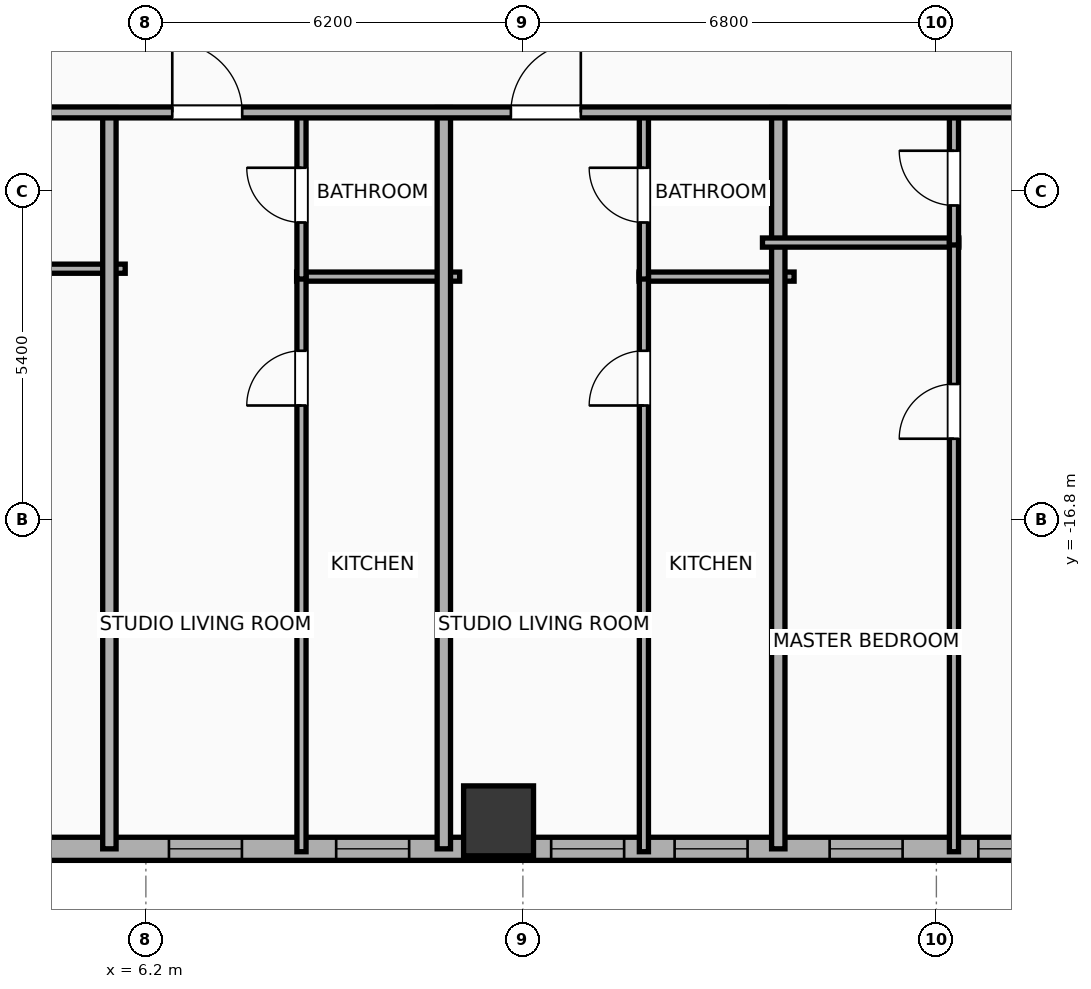
"""IFC4 building model, lengths in metres.
Left out: names, types, materials, properties, quantities, classifications, styles, units other than length and angle.
Written with IfcOpenShell. Run it as: python <this file> out.ifc"""

import sys

from ifc_helpers import new_model, si_unit, direction, frame, frame_2d, origin, origin_2d, place, context, subcontext, project, spatial, rectangle, hollow_rectangle, extrude, element, fill, save


model = new_model("IFC4")
c1 = context("Model", 3, precision=1e-05, world=origin(), true_north=direction((0.0, 1.0)))
c2 = subcontext(c1, "Body", "Model", "MODEL_VIEW")
j1 = project(units=[si_unit("LENGTHUNIT", "METRE"), si_unit("PLANEANGLEUNIT", "RADIAN")], contexts=[c1])
p1 = place(None, origin())
s1 = spatial("IfcSite", under=j1, at=p1, CompositionType="ELEMENT")
p2 = place(p1, origin())
s2 = spatial("IfcBuilding", under=s1, at=p2, CompositionType="ELEMENT")
p3 = place(p2, frame((0.0, 0.0, 41.6)))
s3 = spatial("IfcBuildingStorey", under=s2, at=p3, CompositionType="ELEMENT", Elevation=41.6)
p4 = place(p3, frame((12.0, -21.75, 0.0), z_axis=(0.0, 0.0, 1.0), x_axis=(1.0, 0.0, 0.0)))
e1 = element("IfcColumn", 1, at=p4, inside=s3, PredefinedType="COLUMN", context=c2, shape_type="SweptSolid", body=[
    extrude(hollow_rectangle(XDim=1.15, YDim=1.15, WallThickness=0.04, at=origin_2d()), origin(), (0.0, 0.0, 1.0), 3.9),
])
p5 = place(p3, frame((22.381, -22.21, 0.0), z_axis=(0.0, 0.0, 1.0), x_axis=(-1.0, 0.0, 0.0)))
e2 = element("IfcWall", 2, at=p5, inside=s3, PredefinedType="ELEMENTEDWALL", context=c2, shape_type="SweptSolid", body=[
    extrude(rectangle(XDim=51.963, YDim=0.38, at=frame_2d((25.981, 0.0))), origin(), (0.0, 0.0, 1.0), 3.65),
])
p6 = place(p5, frame((42.952, 0.0, 0.75)))
e3 = element("IfcOpeningElement", 3, at=p6, cuts=e2, PredefinedType="OPENING", context=c2, shape_type="SweptSolid", body=[
    extrude(rectangle(XDim=2.4, YDim=2.1, at=frame_2d((1.2, 1.05))), frame((0.0, 0.2, 0.0), z_axis=(0.0, -1.0, 0.0), x_axis=(1.0, 0.0, 0.0)), (0.0, 0.0, 1.0), 0.4),
])
p7 = place(p5, frame((49.847, 0.0, 0.75)))
e4 = element("IfcOpeningElement", 4, at=p7, cuts=e2, PredefinedType="OPENING", context=c2, shape_type="SweptSolid", body=[
    extrude(rectangle(XDim=1.2, YDim=2.05, at=frame_2d((0.6, 1.025))), frame((0.0, 0.2, 0.0), z_axis=(0.0, -1.0, 0.0), x_axis=(1.0, 0.0, 0.0)), (0.0, 0.0, 1.0), 0.4),
])
p8 = place(p5, frame((47.445, 0.0, 0.75)))
e5 = element("IfcOpeningElement", 5, at=p8, cuts=e2, PredefinedType="OPENING", context=c2, shape_type="SweptSolid", body=[
    extrude(rectangle(XDim=1.2, YDim=2.05, at=frame_2d((0.6, 1.025))), frame((0.0, 0.2, 0.0), z_axis=(0.0, -1.0, 0.0), x_axis=(1.0, 0.0, 0.0)), (0.0, 0.0, 1.0), 0.4),
])
p9 = place(p5, frame((39.526, 0.0, 0.75)))
e6 = element("IfcOpeningElement", 6, at=p9, cuts=e2, PredefinedType="OPENING", context=c2, shape_type="SweptSolid", body=[
    extrude(rectangle(XDim=1.2, YDim=2.05, at=frame_2d((0.6, 1.025))), frame((0.0, 0.2, 0.0), z_axis=(0.0, -1.0, 0.0), x_axis=(1.0, 0.0, 0.0)), (0.0, 0.0, 1.0), 0.4),
])
p10 = place(p5, frame((33.018, 0.0, 0.75)))
e7 = element("IfcOpeningElement", 7, at=p10, cuts=e2, PredefinedType="OPENING", context=c2, shape_type="SweptSolid", body=[
    extrude(rectangle(XDim=1.2, YDim=2.05, at=frame_2d((0.6, 1.025))), frame((0.0, 0.2, 0.0), z_axis=(0.0, -1.0, 0.0), x_axis=(1.0, 0.0, 0.0)), (0.0, 0.0, 1.0), 0.4),
])
p11 = place(p5, frame((36.813, 0.0, 0.75)))
e8 = element("IfcOpeningElement", 8, at=p11, cuts=e2, PredefinedType="OPENING", context=c2, shape_type="SweptSolid", body=[
    extrude(rectangle(XDim=1.2, YDim=2.05, at=frame_2d((0.6, 1.025))), frame((0.0, 0.2, 0.0), z_axis=(0.0, -1.0, 0.0), x_axis=(1.0, 0.0, 0.0)), (0.0, 0.0, 1.0), 0.4),
])
p12 = place(p5, frame((28.886, 0.0, 0.75)))
e9 = element("IfcOpeningElement", 9, at=p12, cuts=e2, PredefinedType="OPENING", context=c2, shape_type="SweptSolid", body=[
    extrude(rectangle(XDim=1.2, YDim=2.05, at=frame_2d((0.6, 1.025))), frame((0.0, 0.2, 0.0), z_axis=(0.0, -1.0, 0.0), x_axis=(1.0, 0.0, 0.0)), (0.0, 0.0, 1.0), 0.4),
])
p13 = place(p5, frame((23.306, 0.0, 0.75)))
e10 = element("IfcOpeningElement", 10, at=p13, cuts=e2, PredefinedType="OPENING", context=c2, shape_type="SweptSolid", body=[
    extrude(rectangle(XDim=1.2, YDim=2.05, at=frame_2d((0.6, 1.025))), frame((0.0, 0.2, 0.0), z_axis=(0.0, -1.0, 0.0), x_axis=(1.0, 0.0, 0.0)), (0.0, 0.0, 1.0), 0.4),
])
p14 = place(p5, frame((26.056, 0.0, 0.75)))
e11 = element("IfcOpeningElement", 11, at=p14, cuts=e2, PredefinedType="OPENING", context=c2, shape_type="SweptSolid", body=[
    extrude(rectangle(XDim=1.2, YDim=2.05, at=frame_2d((0.6, 1.025))), frame((0.0, 0.2, 0.0), z_axis=(0.0, -1.0, 0.0), x_axis=(1.0, 0.0, 0.0)), (0.0, 0.0, 1.0), 0.4),
])
p15 = place(p5, frame((18.811, 0.0, 0.75)))
e12 = element("IfcOpeningElement", 12, at=p15, cuts=e2, PredefinedType="OPENING", context=c2, shape_type="SweptSolid", body=[
    extrude(rectangle(XDim=1.2, YDim=2.05, at=frame_2d((0.6, 1.025))), frame((0.0, 0.2, 0.0), z_axis=(0.0, -1.0, 0.0), x_axis=(1.0, 0.0, 0.0)), (0.0, 0.0, 1.0), 0.4),
])
p16 = place(p5, frame((14.602, 0.0, 0.75)))
e13 = element("IfcOpeningElement", 13, at=p16, cuts=e2, PredefinedType="OPENING", context=c2, shape_type="SweptSolid", body=[
    extrude(rectangle(XDim=1.2, YDim=2.05, at=frame_2d((0.6, 1.025))), frame((0.0, 0.2, 0.0), z_axis=(0.0, -1.0, 0.0), x_axis=(1.0, 0.0, 0.0)), (0.0, 0.0, 1.0), 0.4),
])
p17 = place(p5, frame((11.852, 0.0, 0.75)))
e14 = element("IfcOpeningElement", 14, at=p17, cuts=e2, PredefinedType="OPENING", context=c2, shape_type="SweptSolid", body=[
    extrude(rectangle(XDim=1.2, YDim=2.05, at=frame_2d((0.6, 1.025))), frame((0.0, 0.2, 0.0), z_axis=(0.0, -1.0, 0.0), x_axis=(1.0, 0.0, 0.0)), (0.0, 0.0, 1.0), 0.4),
])
p18 = place(p5, frame((8.316, 0.0, 0.75)))
e15 = element("IfcOpeningElement", 15, at=p18, cuts=e2, PredefinedType="OPENING", context=c2, shape_type="SweptSolid", body=[
    extrude(rectangle(XDim=1.2, YDim=2.05, at=frame_2d((0.6, 1.025))), frame((0.0, 0.2, 0.0), z_axis=(0.0, -1.0, 0.0), x_axis=(1.0, 0.0, 0.0)), (0.0, 0.0, 1.0), 0.4),
])
p19 = place(p5, frame((6.286, 0.0, 0.75)))
e16 = element("IfcOpeningElement", 16, at=p19, cuts=e2, PredefinedType="OPENING", context=c2, shape_type="SweptSolid", body=[
    extrude(rectangle(XDim=1.2, YDim=2.05, at=frame_2d((0.6, 1.025))), frame((0.0, 0.2, 0.0), z_axis=(0.0, -1.0, 0.0), x_axis=(1.0, 0.0, 0.0)), (0.0, 0.0, 1.0), 0.4),
])
p20 = place(p5, frame((3.737, 0.0, 0.75)))
e17 = element("IfcOpeningElement", 17, at=p20, cuts=e2, PredefinedType="OPENING", context=c2, shape_type="SweptSolid", body=[
    extrude(rectangle(XDim=1.2, YDim=2.05, at=frame_2d((0.6, 1.025))), frame((0.0, 0.2, 0.0), z_axis=(0.0, -1.0, 0.0), x_axis=(1.0, 0.0, 0.0)), (0.0, 0.0, 1.0), 0.4),
])
p21 = place(p5, frame((1.291, 0.0, 0.75)))
e18 = element("IfcOpeningElement", 18, at=p21, cuts=e2, PredefinedType="OPENING", context=c2, shape_type="SweptSolid", body=[
    extrude(rectangle(XDim=1.2, YDim=2.05, at=frame_2d((0.6, 1.025))), frame((0.0, 0.2, 0.0), z_axis=(0.0, -1.0, 0.0), x_axis=(1.0, 0.0, 0.0)), (0.0, 0.0, 1.0), 0.4),
])
p22 = place(p3, frame((3.651, -12.67, 0.0), z_axis=(0.0, 0.0, 1.0), x_axis=(1.0, 0.0, 0.0)))
e19 = element("IfcWall", 19, at=p22, inside=s3, PredefinedType="PLUMBINGWALL", context=c2, shape_type="SweptSolid", body=[
    extrude(rectangle(XDim=2.209, YDim=0.15, at=frame_2d((1.104, 0.0))), origin(), (0.0, 0.0, 1.0), 3.65),
])
p23 = place(p3, frame((5.6, -22.21, 0.0), z_axis=(0.0, 0.0, 1.0), x_axis=(0.0, 1.0, 0.0)))
e20 = element("IfcWall", 20, at=p23, inside=s3, PredefinedType="PARTITIONING", context=c2, shape_type="SweptSolid", body=[
    extrude(rectangle(XDim=12.19, YDim=0.22, at=frame_2d((6.095, 0.0))), origin(), (0.0, 0.0, 1.0), 3.65),
])
p24 = place(p3, frame((8.679, -12.8, 0.0), z_axis=(0.0, 0.0, 1.0), x_axis=(1.0, 0.0, 0.0)))
e21 = element("IfcWall", 21, at=p24, inside=s3, PredefinedType="PLUMBINGWALL", context=c2, shape_type="SweptSolid", body=[
    extrude(rectangle(XDim=2.681, YDim=0.15, at=frame_2d((1.341, 0.0))), origin(), (0.0, 0.0, 1.0), 3.65),
])
p25 = place(p3, frame((8.759, -22.258, 0.0), z_axis=(0.0, 0.0, 1.0), x_axis=(0.0, 1.0, 0.0)))
e22 = element("IfcWall", 22, at=p25, inside=s3, PredefinedType="PLUMBINGWALL", context=c2, shape_type="SweptSolid", body=[
    extrude(rectangle(XDim=9.498, YDim=0.15, at=frame_2d((4.749, 0.0))), origin(), (0.0, 0.0, 1.0), 3.65),
])
p26 = place(p25, frame((7.338, 0.0, 0.0)))
e23 = element("IfcOpeningElement", 23, at=p26, cuts=e22, PredefinedType="OPENING", context=c2, shape_type="SweptSolid", body=[
    extrude(rectangle(XDim=0.9, YDim=2.05, at=frame_2d((0.45, 1.025))), frame((0.0, 0.085, 0.0), z_axis=(0.0, -1.0, 0.0), x_axis=(1.0, 0.0, 0.0)), (0.0, 0.0, 1.0), 0.17),
])
p27 = place(p3, frame((8.759, -12.84, 0.0), z_axis=(0.0, 0.0, 1.0), x_axis=(0.0, 1.0, 0.0)))
e24 = element("IfcWall", 24, at=p27, inside=s3, PredefinedType="PLUMBINGWALL", context=c2, shape_type="SweptSolid", body=[
    extrude(rectangle(XDim=2.76, YDim=0.15, at=frame_2d((1.38, 0.0))), origin(), (0.0, 0.0, 1.0), 3.65),
])
p28 = place(p27, frame((0.93, 0.0, 0.0)))
e25 = element("IfcOpeningElement", 25, at=p28, cuts=e24, PredefinedType="OPENING", context=c2, shape_type="SweptSolid", body=[
    extrude(rectangle(XDim=0.9, YDim=2.05, at=frame_2d((0.45, 1.025))), frame((0.0, 0.085, 0.0), z_axis=(0.0, -1.0, 0.0), x_axis=(1.0, 0.0, 0.0)), (0.0, 0.0, 1.0), 0.17),
])
p29 = place(p3, frame((11.1, -22.21, 0.0), z_axis=(0.0, 0.0, 1.0), x_axis=(0.0, 1.0, 0.0)))
e26 = element("IfcWall", 26, at=p29, inside=s3, PredefinedType="PARTITIONING", context=c2, shape_type="SweptSolid", body=[
    extrude(rectangle(XDim=12.19, YDim=0.22, at=frame_2d((6.095, 0.0))), origin(), (0.0, 0.0, 1.0), 3.65),
])
p30 = place(p3, frame((14.31, -12.8, 0.0), z_axis=(0.0, 0.0, 1.0), x_axis=(1.0, 0.0, 0.0)))
e27 = element("IfcWall", 27, at=p30, inside=s3, PredefinedType="PLUMBINGWALL", context=c2, shape_type="SweptSolid", body=[
    extrude(rectangle(XDim=2.55, YDim=0.15, at=frame_2d((1.275, 0.0))), origin(), (0.0, 0.0, 1.0), 3.65),
])
p31 = place(p3, frame((14.39, -22.258, 0.0), z_axis=(0.0, 0.0, 1.0), x_axis=(0.0, 1.0, 0.0)))
e28 = element("IfcWall", 28, at=p31, inside=s3, PredefinedType="PLUMBINGWALL", context=c2, shape_type="SweptSolid", body=[
    extrude(rectangle(XDim=9.498, YDim=0.15, at=frame_2d((4.749, 0.0))), origin(), (0.0, 0.0, 1.0), 3.65),
])
p32 = place(p31, frame((7.338, 0.0, 0.0)))
e29 = element("IfcOpeningElement", 29, at=p32, cuts=e28, PredefinedType="OPENING", context=c2, shape_type="SweptSolid", body=[
    extrude(rectangle(XDim=0.9, YDim=2.05, at=frame_2d((0.45, 1.025))), frame((0.0, 0.085, 0.0), z_axis=(0.0, -1.0, 0.0), x_axis=(1.0, 0.0, 0.0)), (0.0, 0.0, 1.0), 0.17),
])
p33 = place(p3, frame((14.39, -12.84, 0.0), z_axis=(0.0, 0.0, 1.0), x_axis=(0.0, 1.0, 0.0)))
e30 = element("IfcWall", 30, at=p33, inside=s3, PredefinedType="PLUMBINGWALL", context=c2, shape_type="SweptSolid", body=[
    extrude(rectangle(XDim=2.76, YDim=0.15, at=frame_2d((1.38, 0.0))), origin(), (0.0, 0.0, 1.0), 3.65),
])
p34 = place(p33, frame((0.93, 0.0, 0.0)))
e31 = element("IfcOpeningElement", 31, at=p34, cuts=e30, PredefinedType="OPENING", context=c2, shape_type="SweptSolid", body=[
    extrude(rectangle(XDim=0.9, YDim=2.05, at=frame_2d((0.45, 1.025))), frame((0.0, 0.085, 0.0), z_axis=(0.0, -1.0, 0.0), x_axis=(1.0, 0.0, 0.0)), (0.0, 0.0, 1.0), 0.17),
])
p35 = place(p3, frame((16.6, -22.21, 0.0), z_axis=(0.0, 0.0, 1.0), x_axis=(0.0, 1.0, 0.0)))
e32 = element("IfcWall", 32, at=p35, inside=s3, PredefinedType="PARTITIONING", context=c2, shape_type="SweptSolid", body=[
    extrude(rectangle(XDim=12.19, YDim=0.22, at=frame_2d((6.095, 0.0))), origin(), (0.0, 0.0, 1.0), 3.65),
])
p36 = place(p3, frame((16.34, -12.24, 0.0), z_axis=(0.0, 0.0, 1.0), x_axis=(1.0, 0.0, 0.0)))
e33 = element("IfcWall", 33, at=p36, inside=s3, PredefinedType="PLUMBINGWALL", context=c2, shape_type="SweptSolid", body=[
    extrude(rectangle(XDim=3.229, YDim=0.15, at=frame_2d((1.615, 0.0))), origin(), (0.0, 0.0, 1.0), 3.65),
])
p37 = place(p3, frame((19.489, -22.258, 0.0), z_axis=(0.0, 0.0, 1.0), x_axis=(0.0, 1.0, 0.0)))
e34 = element("IfcWall", 34, at=p37, inside=s3, PredefinedType="PLUMBINGWALL", context=c2, shape_type="SweptSolid", body=[
    extrude(rectangle(XDim=10.058, YDim=0.15, at=frame_2d((5.029, 0.0))), origin(), (0.0, 0.0, 1.0), 3.65),
])
p38 = place(p37, frame((6.792, 0.0, 0.0)))
e35 = element("IfcOpeningElement", 35, at=p38, cuts=e34, PredefinedType="OPENING", context=c2, shape_type="SweptSolid", body=[
    extrude(rectangle(XDim=0.9, YDim=2.05, at=frame_2d((0.45, 1.025))), frame((0.0, 0.085, 0.0), z_axis=(0.0, -1.0, 0.0), x_axis=(1.0, 0.0, 0.0)), (0.0, 0.0, 1.0), 0.17),
])
p39 = place(p3, frame((19.489, -12.28, 0.0), z_axis=(0.0, 0.0, 1.0), x_axis=(0.0, 1.0, 0.0)))
e36 = element("IfcWall", 36, at=p39, inside=s3, PredefinedType="PLUMBINGWALL", context=c2, shape_type="SweptSolid", body=[
    extrude(rectangle(XDim=2.2, YDim=0.15, at=frame_2d((1.1, 0.0))), origin(), (0.0, 0.0, 1.0), 3.65),
])
p40 = place(p39, frame((0.65, 0.0, 0.0)))
e37 = element("IfcOpeningElement", 37, at=p40, cuts=e36, PredefinedType="OPENING", context=c2, shape_type="SweptSolid", body=[
    extrude(rectangle(XDim=0.9, YDim=2.05, at=frame_2d((0.45, 1.025))), frame((0.0, 0.085, 0.0), z_axis=(0.0, -1.0, 0.0), x_axis=(1.0, 0.0, 0.0)), (0.0, 0.0, 1.0), 0.17),
])
p41 = place(p3, frame((-33.41, -10.1, 0.0), z_axis=(0.0, 0.0, 1.0), x_axis=(1.0, 0.0, 0.0)))
e38 = element("IfcWall", 38, at=p41, inside=s3, PredefinedType="PARTITIONING", context=c2, shape_type="SweptSolid", body=[
    extrude(rectangle(XDim=59.62, YDim=0.18, at=frame_2d((29.81, 0.0))), origin(), (0.0, 0.0, 1.0), 3.65),
])
p42 = place(p41, frame((2.746, 0.0, 0.0)))
e39 = element("IfcOpeningElement", 39, at=p42, cuts=e38, PredefinedType="OPENING", context=c2, shape_type="SweptSolid", body=[
    extrude(rectangle(XDim=0.9, YDim=2.05, at=frame_2d((0.45, 1.025))), frame((0.0, 0.1, 0.0), z_axis=(0.0, -1.0, 0.0), x_axis=(1.0, 0.0, 0.0)), (0.0, 0.0, 1.0), 0.2),
])
p43 = place(p41, frame((11.552, 0.0, 0.0)))
e40 = element("IfcOpeningElement", 40, at=p43, cuts=e38, PredefinedType="OPENING", context=c2, shape_type="SweptSolid", body=[
    extrude(rectangle(XDim=1.15, YDim=2.05, at=frame_2d((0.575, 1.025))), frame((0.0, 0.1, 0.0), z_axis=(0.0, -1.0, 0.0), x_axis=(1.0, 0.0, 0.0)), (0.0, 0.0, 1.0), 0.2),
])
p44 = place(p41, frame((22.379, 0.0, 0.0)))
e41 = element("IfcOpeningElement", 41, at=p44, cuts=e38, PredefinedType="OPENING", context=c2, shape_type="SweptSolid", body=[
    extrude(rectangle(XDim=1.15, YDim=2.05, at=frame_2d((0.575, 1.025))), frame((0.0, 0.1, 0.0), z_axis=(0.0, -1.0, 0.0), x_axis=(1.0, 0.0, 0.0)), (0.0, 0.0, 1.0), 0.2),
])
p45 = place(p41, frame((31.28, 0.0, 0.0)))
e42 = element("IfcOpeningElement", 42, at=p45, cuts=e38, PredefinedType="OPENING", context=c2, shape_type="SweptSolid", body=[
    extrude(rectangle(XDim=1.15, YDim=2.05, at=frame_2d((0.575, 1.025))), frame((0.0, 0.1, 0.0), z_axis=(0.0, -1.0, 0.0), x_axis=(1.0, 0.0, 0.0)), (0.0, 0.0, 1.0), 0.2),
])
p46 = place(p41, frame((36.02, 0.0, 0.0)))
e43 = element("IfcOpeningElement", 43, at=p46, cuts=e38, PredefinedType="OPENING", context=c2, shape_type="SweptSolid", body=[
    extrude(rectangle(XDim=0.9, YDim=2.05, at=frame_2d((0.45, 1.025))), frame((0.0, 0.1, 0.0), z_axis=(0.0, -1.0, 0.0), x_axis=(1.0, 0.0, 0.0)), (0.0, 0.0, 1.0), 0.2),
])
p47 = place(p41, frame((40.044, 0.0, 0.0)))
e44 = element("IfcOpeningElement", 44, at=p47, cuts=e38, PredefinedType="OPENING", context=c2, shape_type="SweptSolid", body=[
    extrude(rectangle(XDim=1.15, YDim=2.05, at=frame_2d((0.575, 1.025))), frame((0.0, 0.1, 0.0), z_axis=(0.0, -1.0, 0.0), x_axis=(1.0, 0.0, 0.0)), (0.0, 0.0, 1.0), 0.2),
])
p48 = place(p41, frame((45.613, 0.0, 0.0)))
e45 = element("IfcOpeningElement", 45, at=p48, cuts=e38, PredefinedType="OPENING", context=c2, shape_type="SweptSolid", body=[
    extrude(rectangle(XDim=1.15, YDim=2.05, at=frame_2d((0.575, 1.025))), frame((0.0, 0.1, 0.0), z_axis=(0.0, -1.0, 0.0), x_axis=(1.0, 0.0, 0.0)), (0.0, 0.0, 1.0), 0.2),
])
p49 = place(p41, frame((54.174, 0.0, 0.0)))
e46 = element("IfcOpeningElement", 46, at=p49, cuts=e38, PredefinedType="OPENING", context=c2, shape_type="SweptSolid", body=[
    extrude(rectangle(XDim=1.15, YDim=2.05, at=frame_2d((0.575, 1.025))), frame((0.0, 0.1, 0.0), z_axis=(0.0, -1.0, 0.0), x_axis=(1.0, 0.0, 0.0)), (0.0, 0.0, 1.0), 0.2),
])
p50 = place(p16, origin())
e47 = element("IfcWindow", 47, at=p50, inside=s3, PartitioningType="SINGLE_PANEL", PredefinedType="WINDOW", context=c2, shape_type="SweptSolid", body=[
    extrude(rectangle(XDim=1.2, YDim=2.05, at=frame_2d((0.6, 1.025))), frame((0.0, 0.03, 0.0), z_axis=(0.0, -1.0, 0.0), x_axis=(1.0, 0.0, 0.0)), (0.0, 0.0, 1.0), 0.06),
])
fill(e13, e47)
p51 = place(p17, origin())
e48 = element("IfcWindow", 48, at=p51, inside=s3, PartitioningType="SINGLE_PANEL", PredefinedType="WINDOW", context=c2, shape_type="SweptSolid", body=[
    extrude(rectangle(XDim=1.2, YDim=2.05, at=frame_2d((0.6, 1.025))), frame((0.0, 0.03, 0.0), z_axis=(0.0, -1.0, 0.0), x_axis=(1.0, 0.0, 0.0)), (0.0, 0.0, 1.0), 0.06),
])
fill(e14, e48)
p52 = place(p18, origin())
e49 = element("IfcWindow", 49, at=p52, inside=s3, PartitioningType="SINGLE_PANEL", PredefinedType="WINDOW", context=c2, shape_type="SweptSolid", body=[
    extrude(rectangle(XDim=1.2, YDim=2.05, at=frame_2d((0.6, 1.025))), frame((0.0, 0.03, 0.0), z_axis=(0.0, -1.0, 0.0), x_axis=(1.0, 0.0, 0.0)), (0.0, 0.0, 1.0), 0.06),
])
fill(e15, e49)
p53 = place(p19, origin())
e50 = element("IfcWindow", 50, at=p53, inside=s3, PartitioningType="SINGLE_PANEL", PredefinedType="WINDOW", context=c2, shape_type="SweptSolid", body=[
    extrude(rectangle(XDim=1.2, YDim=2.05, at=frame_2d((0.6, 1.025))), frame((0.0, 0.03, 0.0), z_axis=(0.0, -1.0, 0.0), x_axis=(1.0, 0.0, 0.0)), (0.0, 0.0, 1.0), 0.06),
])
fill(e16, e50)
p54 = place(p20, origin())
e51 = element("IfcWindow", 51, at=p54, inside=s3, PartitioningType="SINGLE_PANEL", PredefinedType="WINDOW", context=c2, shape_type="SweptSolid", body=[
    extrude(rectangle(XDim=1.2, YDim=2.05, at=frame_2d((0.6, 1.025))), frame((0.0, 0.03, 0.0), z_axis=(0.0, -1.0, 0.0), x_axis=(1.0, 0.0, 0.0)), (0.0, 0.0, 1.0), 0.06),
])
fill(e17, e51)
p55 = place(p21, origin())
e52 = element("IfcWindow", 52, at=p55, inside=s3, PartitioningType="SINGLE_PANEL", PredefinedType="WINDOW", context=c2, shape_type="SweptSolid", body=[
    extrude(rectangle(XDim=1.2, YDim=2.05, at=frame_2d((0.6, 1.025))), frame((0.0, 0.03, 0.0), z_axis=(0.0, -1.0, 0.0), x_axis=(1.0, 0.0, 0.0)), (0.0, 0.0, 1.0), 0.06),
])
fill(e18, e52)
p56 = place(p26, origin())
e53 = element("IfcDoor", 53, at=p56, inside=s3, OperationType="SINGLE_SWING_LEFT", PredefinedType="DOOR", context=c2, shape_type="SweptSolid", body=[
    extrude(rectangle(XDim=0.9, YDim=2.05, at=frame_2d((0.45, 1.025))), frame((0.0, 0.025, 0.0), z_axis=(0.0, -1.0, 0.0), x_axis=(1.0, 0.0, 0.0)), (0.0, 0.0, 1.0), 0.05),
])
fill(e23, e53)
p57 = place(p28, origin())
e54 = element("IfcDoor", 54, at=p57, inside=s3, OperationType="SINGLE_SWING_RIGHT", PredefinedType="DOOR", context=c2, shape_type="SweptSolid", body=[
    extrude(rectangle(XDim=0.9, YDim=2.05, at=frame_2d((0.45, 1.025))), frame((0.0, 0.025, 0.0), z_axis=(0.0, -1.0, 0.0), x_axis=(1.0, 0.0, 0.0)), (0.0, 0.0, 1.0), 0.05),
])
fill(e25, e54)
p58 = place(p32, origin())
e55 = element("IfcDoor", 55, at=p58, inside=s3, OperationType="SINGLE_SWING_LEFT", PredefinedType="DOOR", context=c2, shape_type="SweptSolid", body=[
    extrude(rectangle(XDim=0.9, YDim=2.05, at=frame_2d((0.45, 1.025))), frame((0.0, 0.025, 0.0), z_axis=(0.0, -1.0, 0.0), x_axis=(1.0, 0.0, 0.0)), (0.0, 0.0, 1.0), 0.05),
])
fill(e29, e55)
p59 = place(p34, origin())
e56 = element("IfcDoor", 56, at=p59, inside=s3, OperationType="SINGLE_SWING_RIGHT", PredefinedType="DOOR", context=c2, shape_type="SweptSolid", body=[
    extrude(rectangle(XDim=0.9, YDim=2.05, at=frame_2d((0.45, 1.025))), frame((0.0, 0.025, 0.0), z_axis=(0.0, -1.0, 0.0), x_axis=(1.0, 0.0, 0.0)), (0.0, 0.0, 1.0), 0.05),
])
fill(e31, e56)
p60 = place(p38, origin())
e57 = element("IfcDoor", 57, at=p60, inside=s3, OperationType="SINGLE_SWING_LEFT", PredefinedType="DOOR", context=c2, shape_type="SweptSolid", body=[
    extrude(rectangle(XDim=0.9, YDim=2.05, at=frame_2d((0.45, 1.025))), frame((0.0, 0.025, 0.0), z_axis=(0.0, -1.0, 0.0), x_axis=(1.0, 0.0, 0.0)), (0.0, 0.0, 1.0), 0.05),
])
fill(e35, e57)
p61 = place(p40, origin())
e58 = element("IfcDoor", 58, at=p61, inside=s3, OperationType="SINGLE_SWING_RIGHT", PredefinedType="DOOR", context=c2, shape_type="SweptSolid", body=[
    extrude(rectangle(XDim=0.9, YDim=2.05, at=frame_2d((0.45, 1.025))), frame((0.0, 0.025, 0.0), z_axis=(0.0, -1.0, 0.0), x_axis=(1.0, 0.0, 0.0)), (0.0, 0.0, 1.0), 0.05),
])
fill(e37, e58)
p62 = place(p47, origin())
e59 = element("IfcDoor", 59, at=p62, inside=s3, OperationType="SINGLE_SWING_LEFT", PredefinedType="DOOR", context=c2, shape_type="SweptSolid", body=[
    extrude(rectangle(XDim=1.15, YDim=2.05, at=frame_2d((0.575, 1.025))), frame((0.0, 0.025, 0.0), z_axis=(0.0, -1.0, 0.0), x_axis=(1.0, 0.0, 0.0)), (0.0, 0.0, 1.0), 0.05),
])
fill(e44, e59)
p63 = place(p48, origin())
e60 = element("IfcDoor", 60, at=p63, inside=s3, OperationType="SINGLE_SWING_RIGHT", PredefinedType="DOOR", context=c2, shape_type="SweptSolid", body=[
    extrude(rectangle(XDim=1.15, YDim=2.05, at=frame_2d((0.575, 1.025))), frame((0.0, 0.025, 0.0), z_axis=(0.0, -1.0, 0.0), x_axis=(1.0, 0.0, 0.0)), (0.0, 0.0, 1.0), 0.05),
])
fill(e45, e60)
save(model, sys.argv[1])
